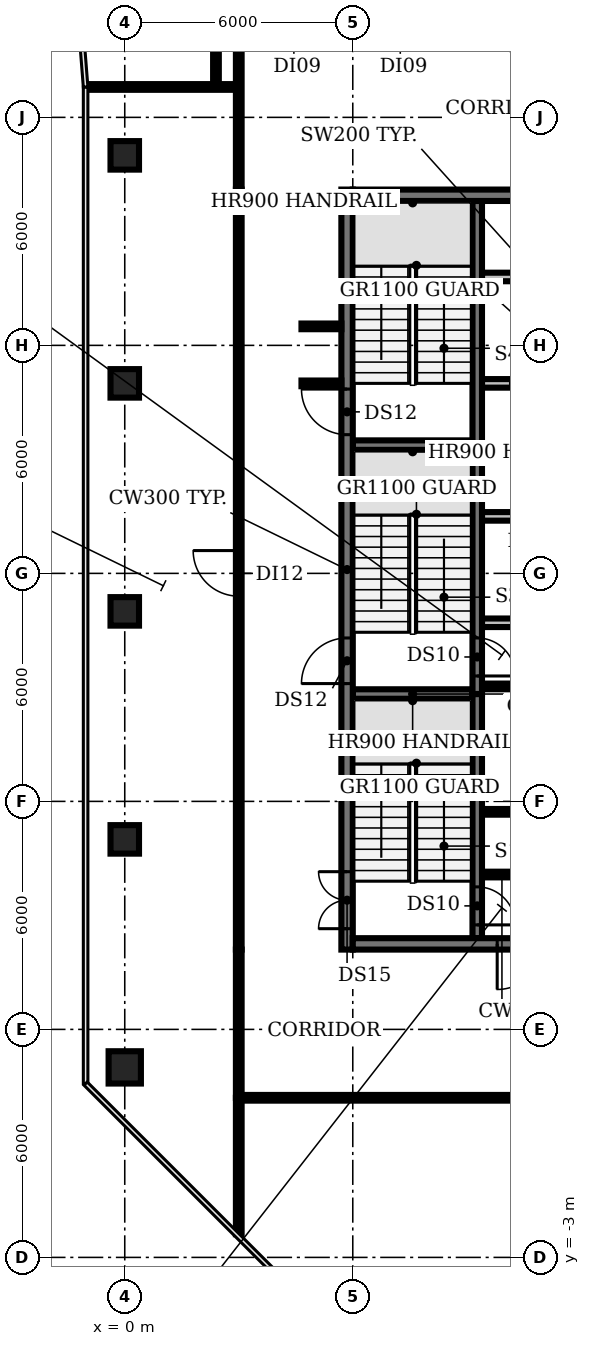
"""IFC4 building model, lengths in metres.
Left out: names, types, materials, properties, quantities, classifications, styles, units other than length and angle.
Written with IfcOpenShell. Run it as: python <this file> out.ifc"""

import sys

from ifc_helpers import new_model, si_unit, direction, frame, frame_2d, origin, origin_2d, place, context, subcontext, project, spatial, rectangle, circle, extrude, element, fill, save


model = new_model("IFC4")
c1 = context("Model", 3, precision=1e-05, world=origin(), true_north=direction((0.0, 1.0)))
c2 = subcontext(c1, "Body", "Model", "MODEL_VIEW")
j1 = project(units=[si_unit("LENGTHUNIT", "METRE"), si_unit("PLANEANGLEUNIT", "RADIAN")], contexts=[c1])
p1 = place(None, origin())
s1 = spatial("IfcSite", under=j1, at=p1, CompositionType="ELEMENT")
p2 = place(p1, origin())
s2 = spatial("IfcBuilding", under=s1, at=p2, CompositionType="ELEMENT")
p3 = place(p2, frame((0.0, 0.0, 306.2)))
s3 = spatial("IfcBuildingStorey", under=s2, at=p3, CompositionType="ELEMENT", Elevation=306.2)
p4 = place(p3, frame((0.0, 2.0, 0.0), z_axis=(0.0, 0.0, 1.0), x_axis=(1.0, 0.0, 0.0)))
e1 = element("IfcColumn", 1, at=p4, inside=s3, PredefinedType="COLUMN", context=c2, shape_type="SweptSolid", body=[
    extrude(circle(Radius=0.425, at=origin_2d()), origin(), (0.0, 0.0, 1.0), 3.85),
])
for number, where, z_axis, x_axis in (
    (2, (0.0, 8.0, 0.0), (0.0, 0.0, 1.0), (1.0, 0.0, 0.0)),
    (3, (0.0, 14.0, 0.0), (0.0, 0.0, 1.0), (1.0, 0.0, 0.0)),
    (4, (0.0, 20.0, 0.0), (0.0, 0.0, 1.0), (1.0, 0.0, 0.0)),
    (5, (0.0, 26.0, 0.0), (0.0, 0.0, 1.0), (1.0, 0.0, 0.0)),
):
    element("IfcColumn", number, at=place(p3, frame(where, z_axis=z_axis, x_axis=x_axis)), inside=s3, PredefinedType="COLUMN", context=c2, shape_type="SweptSolid", body=[
        extrude(rectangle(XDim=0.75, YDim=0.75, at=origin_2d()), origin(), (0.0, 0.0, 1.0), 3.85),
    ])
for number, where, z_axis, x_axis in (
    (6, (9.4, 7.075, 0.0), (0.0, 0.0, 1.0), (1.0, 0.0, 0.0)),
    (7, (9.4, 8.725, 0.0), (0.0, 0.0, 1.0), (1.0, 0.0, 0.0)),
    (8, (9.4, 10.375, 0.0), (0.0, 0.0, 1.0), (1.0, 0.0, 0.0)),
):
    element("IfcWall", number, at=place(p3, frame(where, z_axis=z_axis, x_axis=x_axis)), inside=s3, PredefinedType="SHEAR", context=c2, shape_type="SweptSolid", body=[
        extrude(rectangle(XDim=1.05, YDim=0.15, at=frame_2d((0.525, 0.0))), origin(), (0.0, 0.0, 1.0), 3.85),
    ])
p5 = place(p3, frame((6.0, 11.825, 0.0), z_axis=(0.0, 0.0, 1.0), x_axis=(1.0, 0.0, 0.0)))
e9 = element("IfcWall", 9, at=p5, inside=s3, PredefinedType="SHEAR", context=c2, shape_type="SweptSolid", body=[
    extrude(rectangle(XDim=3.15, YDim=0.25, at=frame_2d((1.575, 0.0))), origin(), (0.0, 0.0, 1.0), 3.85),
])
p6 = place(p3, frame((9.4, 12.025, 0.0), z_axis=(0.0, 0.0, 1.0), x_axis=(1.0, 0.0, 0.0)))
e10 = element("IfcWall", 10, at=p6, inside=s3, PredefinedType="SHEAR", context=c2, shape_type="SweptSolid", body=[
    extrude(rectangle(XDim=1.05, YDim=0.15, at=frame_2d((0.525, 0.0))), origin(), (0.0, 0.0, 1.0), 3.85),
])
p7 = place(p3, frame((9.4, 13.7, 0.0), z_axis=(0.0, 0.0, 1.0), x_axis=(1.0, 0.0, 0.0)))
e11 = element("IfcWall", 11, at=p7, inside=s3, PredefinedType="PARTITIONING", context=c2, shape_type="SweptSolid", body=[
    extrude(rectangle(XDim=4.0, YDim=0.225, at=frame_2d((2.0, 0.0))), origin(), (0.0, 0.0, 1.0), 3.85),
])
p8 = place(p3, frame((9.4, 16.5, 0.0), z_axis=(0.0, 0.0, 1.0), x_axis=(1.0, 0.0, 0.0)))
e12 = element("IfcWall", 12, at=p8, inside=s3, PredefinedType="PARTITIONING", context=c2, shape_type="SweptSolid", body=[
    extrude(rectangle(XDim=14.6, YDim=0.225, at=frame_2d((7.3, 0.0))), origin(), (0.0, 0.0, 1.0), 3.85),
])
p9 = place(p8, frame((0.85, 0.0, 0.0)))
e13 = element("IfcOpeningElement", 13, at=p9, cuts=e12, PredefinedType="OPENING", context=c2, shape_type="SweptSolid", body=[
    extrude(rectangle(XDim=0.9, YDim=2.1, at=frame_2d((0.45, 1.05))), frame((0.0, 0.123, 0.0), z_axis=(0.0, -1.0, 0.0), x_axis=(1.0, 0.0, 0.0)), (0.0, 0.0, 1.0), 0.245),
])
p10 = place(p8, frame((3.625, 0.0, 0.0)))
e14 = element("IfcOpeningElement", 14, at=p10, cuts=e12, PredefinedType="OPENING", context=c2, shape_type="SweptSolid", body=[
    extrude(rectangle(XDim=0.9, YDim=2.1, at=frame_2d((0.45, 1.05))), frame((0.0, 0.123, 0.0), z_axis=(0.0, -1.0, 0.0), x_axis=(1.0, 0.0, 0.0)), (0.0, 0.0, 1.0), 0.245),
])
p11 = place(p8, frame((7.775, 0.0, 0.0)))
e15 = element("IfcOpeningElement", 15, at=p11, cuts=e12, PredefinedType="OPENING", context=c2, shape_type="SweptSolid", body=[
    extrude(rectangle(XDim=1.0, YDim=2.1, at=frame_2d((0.5, 1.05))), frame((0.0, 0.123, 0.0), z_axis=(0.0, -1.0, 0.0), x_axis=(1.0, 0.0, 0.0)), (0.0, 0.0, 1.0), 0.245),
])
p12 = place(p8, frame((11.308, 0.0, 0.0)))
e16 = element("IfcOpeningElement", 16, at=p12, cuts=e12, PredefinedType="OPENING", context=c2, shape_type="SweptSolid", body=[
    extrude(rectangle(XDim=0.9, YDim=2.1, at=frame_2d((0.45, 1.05))), frame((0.0, 0.123, 0.0), z_axis=(0.0, -1.0, 0.0), x_axis=(1.0, 0.0, 0.0)), (0.0, 0.0, 1.0), 0.245),
])
p13 = place(p8, frame((13.083, 0.0, 0.0)))
e17 = element("IfcOpeningElement", 17, at=p13, cuts=e12, PredefinedType="OPENING", context=c2, shape_type="SweptSolid", body=[
    extrude(rectangle(XDim=0.9, YDim=2.1, at=frame_2d((0.45, 1.05))), frame((0.0, 0.123, 0.0), z_axis=(0.0, -1.0, 0.0), x_axis=(1.0, 0.0, 0.0)), (0.0, 0.0, 1.0), 0.245),
])
p14 = place(p3, frame((6.0, 18.375, 0.0), z_axis=(0.0, 0.0, 1.0), x_axis=(1.0, 0.0, 0.0)))
e18 = element("IfcWall", 18, at=p14, inside=s3, PredefinedType="SHEAR", context=c2, shape_type="SweptSolid", body=[
    extrude(rectangle(XDim=3.15, YDim=0.25, at=frame_2d((1.575, 0.0))), origin(), (0.0, 0.0, 1.0), 3.85),
])
p15 = place(p3, frame((24.0, 20.0, 0.0), z_axis=(0.0, 0.0, 1.0), x_axis=(-1.0, 0.0, 0.0)))
e19 = element("IfcWall", 19, at=p15, inside=s3, PredefinedType="PARTITIONING", context=c2, shape_type="SweptSolid", body=[
    extrude(rectangle(XDim=14.6, YDim=0.225, at=frame_2d((7.3, 0.0))), origin(), (0.0, 0.0, 1.0), 3.85),
])
p16 = place(p15, frame((12.75, 0.0, 0.0)))
e20 = element("IfcOpeningElement", 20, at=p16, cuts=e19, PredefinedType="OPENING", context=c2, shape_type="SweptSolid", body=[
    extrude(rectangle(XDim=1.1, YDim=2.1, at=frame_2d((0.55, 1.05))), frame((0.0, 0.123, 0.0), z_axis=(0.0, -1.0, 0.0), x_axis=(1.0, 0.0, 0.0)), (0.0, 0.0, 1.0), 0.245),
])
p17 = place(p15, frame((9.95, 0.0, 0.0)))
e21 = element("IfcOpeningElement", 21, at=p17, cuts=e19, PredefinedType="OPENING", context=c2, shape_type="SweptSolid", body=[
    extrude(rectangle(XDim=1.1, YDim=2.1, at=frame_2d((0.55, 1.05))), frame((0.0, 0.123, 0.0), z_axis=(0.0, -1.0, 0.0), x_axis=(1.0, 0.0, 0.0)), (0.0, 0.0, 1.0), 0.245),
])
p18 = place(p15, frame((7.15, 0.0, 0.0)))
e22 = element("IfcOpeningElement", 22, at=p18, cuts=e19, PredefinedType="OPENING", context=c2, shape_type="SweptSolid", body=[
    extrude(rectangle(XDim=1.1, YDim=2.1, at=frame_2d((0.55, 1.05))), frame((0.0, 0.123, 0.0), z_axis=(0.0, -1.0, 0.0), x_axis=(1.0, 0.0, 0.0)), (0.0, 0.0, 1.0), 0.245),
])
p19 = place(p15, frame((4.35, 0.0, 0.0)))
e23 = element("IfcOpeningElement", 23, at=p19, cuts=e19, PredefinedType="OPENING", context=c2, shape_type="SweptSolid", body=[
    extrude(rectangle(XDim=1.1, YDim=2.1, at=frame_2d((0.55, 1.05))), frame((0.0, 0.123, 0.0), z_axis=(0.0, -1.0, 0.0), x_axis=(1.0, 0.0, 0.0)), (0.0, 0.0, 1.0), 0.245),
])
p20 = place(p15, frame((2.308, 0.0, 0.0)))
e24 = element("IfcOpeningElement", 24, at=p20, cuts=e19, PredefinedType="OPENING", context=c2, shape_type="SweptSolid", body=[
    extrude(rectangle(XDim=0.9, YDim=2.1, at=frame_2d((0.45, 1.05))), frame((0.0, 0.123, 0.0), z_axis=(0.0, -1.0, 0.0), x_axis=(1.0, 0.0, 0.0)), (0.0, 0.0, 1.0), 0.245),
])
p21 = place(p15, frame((0.633, 0.0, 0.0)))
e25 = element("IfcOpeningElement", 25, at=p21, cuts=e19, PredefinedType="OPENING", context=c2, shape_type="SweptSolid", body=[
    extrude(rectangle(XDim=0.9, YDim=2.1, at=frame_2d((0.45, 1.05))), frame((0.0, 0.123, 0.0), z_axis=(0.0, -1.0, 0.0), x_axis=(1.0, 0.0, 0.0)), (0.0, 0.0, 1.0), 0.245),
])
p22 = place(p3, frame((9.4, 22.8, 0.0), z_axis=(0.0, 0.0, 1.0), x_axis=(1.0, 0.0, 0.0)))
e26 = element("IfcWall", 26, at=p22, inside=s3, PredefinedType="PARTITIONING", context=c2, shape_type="SweptSolid", body=[
    extrude(rectangle(XDim=14.6, YDim=0.225, at=frame_2d((7.3, 0.0))), origin(), (0.0, 0.0, 1.0), 3.85),
])
p23 = place(p3, frame((9.275, 11.825, 0.0), z_axis=(0.0, 0.0, 1.0), x_axis=(0.0, -1.0, 0.0)))
e27 = element("IfcWall", 27, at=p23, inside=s3, PredefinedType="SHEAR", context=c2, shape_type="SweptSolid", body=[
    extrude(rectangle(XDim=6.425, YDim=0.25, at=frame_2d((3.212, 0.0))), origin(), (0.0, 0.0, 1.0), 3.85),
])
p24 = place(p23, frame((5.075, 0.0, 0.0)))
e28 = element("IfcOpeningElement", 28, at=p24, cuts=e27, PredefinedType="OPENING", context=c2, shape_type="SweptSolid", body=[
    extrude(rectangle(XDim=1.0, YDim=2.1, at=frame_2d((0.5, 1.05))), frame((0.0, 0.135, 0.0), z_axis=(0.0, -1.0, 0.0), x_axis=(1.0, 0.0, 0.0)), (0.0, 0.0, 1.0), 0.27),
])
p25 = place(p3, frame((9.275, 18.375, 0.0), z_axis=(0.0, 0.0, 1.0), x_axis=(0.0, -1.0, 0.0)))
e29 = element("IfcWall", 29, at=p25, inside=s3, PredefinedType="SHEAR", context=c2, shape_type="SweptSolid", body=[
    extrude(rectangle(XDim=6.55, YDim=0.25, at=frame_2d((3.275, 0.0))), origin(), (0.0, 0.0, 1.0), 3.85),
])
p26 = place(p25, frame((5.075, 0.0, 0.0)))
e30 = element("IfcOpeningElement", 30, at=p26, cuts=e29, PredefinedType="OPENING", context=c2, shape_type="SweptSolid", body=[
    extrude(rectangle(XDim=1.0, YDim=2.1, at=frame_2d((0.5, 1.05))), frame((0.0, 0.135, 0.0), z_axis=(0.0, -1.0, 0.0), x_axis=(1.0, 0.0, 0.0)), (0.0, 0.0, 1.0), 0.27),
])
p27 = place(p3, frame((9.275, 18.375, 0.0), z_axis=(0.0, 0.0, 1.0), x_axis=(0.0, 1.0, 0.0)))
e31 = element("IfcWall", 31, at=p27, inside=s3, PredefinedType="SHEAR", context=c2, shape_type="SweptSolid", body=[
    extrude(rectangle(XDim=6.425, YDim=0.25, at=frame_2d((3.212, 0.0))), origin(), (0.0, 0.0, 1.0), 3.85),
])
p28 = place(p3, frame((5.85, 5.1, 0.0), z_axis=(0.0, 0.0, 1.0), x_axis=(0.0, 1.0, 0.0)))
e32 = element("IfcWall", 32, at=p28, inside=s3, PredefinedType="SHEAR", context=c2, shape_type="SweptSolid", body=[
    extrude(rectangle(XDim=20.0, YDim=0.3, at=frame_2d((10.0, 0.0))), origin(), (0.0, 0.0, 1.0), 3.85),
])
p29 = place(p28, frame((0.55, 0.0, 0.0)))
e33 = element("IfcOpeningElement", 33, at=p29, cuts=e32, PredefinedType="OPENING", context=c2, shape_type="SweptSolid", body=[
    extrude(rectangle(XDim=1.5, YDim=2.1, at=frame_2d((0.75, 1.05))), frame((0.0, 0.16, 0.0), z_axis=(0.0, -1.0, 0.0), x_axis=(1.0, 0.0, 0.0)), (0.0, 0.0, 1.0), 0.32),
])
p30 = place(p28, frame((7.0, 0.0, 0.0)))
e34 = element("IfcOpeningElement", 34, at=p30, cuts=e32, PredefinedType="OPENING", context=c2, shape_type="SweptSolid", body=[
    extrude(rectangle(XDim=1.2, YDim=2.1, at=frame_2d((0.6, 1.05))), frame((0.0, 0.16, 0.0), z_axis=(0.0, -1.0, 0.0), x_axis=(1.0, 0.0, 0.0)), (0.0, 0.0, 1.0), 0.32),
])
p31 = place(p28, frame((13.55, 0.0, 0.0)))
e35 = element("IfcOpeningElement", 35, at=p31, cuts=e32, PredefinedType="OPENING", context=c2, shape_type="SweptSolid", body=[
    extrude(rectangle(XDim=1.2, YDim=2.1, at=frame_2d((0.6, 1.05))), frame((0.0, 0.16, 0.0), z_axis=(0.0, -1.0, 0.0), x_axis=(1.0, 0.0, 0.0)), (0.0, 0.0, 1.0), 0.32),
])
p32 = place(p3, frame((24.0, 5.25, 0.0), z_axis=(0.0, 0.0, 1.0), x_axis=(-1.0, 0.0, 0.0)))
e36 = element("IfcWall", 36, at=p32, inside=s3, PredefinedType="SHEAR", context=c2, shape_type="SweptSolid", body=[
    extrude(rectangle(XDim=18.0, YDim=0.3, at=frame_2d((9.0, 0.0))), origin(), (0.0, 0.0, 1.0), 3.85),
])
p33 = place(p32, frame((13.0, 0.0, 0.0)))
e37 = element("IfcOpeningElement", 37, at=p33, cuts=e36, PredefinedType="OPENING", context=c2, shape_type="SweptSolid", body=[
    extrude(rectangle(XDim=1.2, YDim=2.1, at=frame_2d((0.6, 1.05))), frame((0.0, 0.16, 0.0), z_axis=(0.0, -1.0, 0.0), x_axis=(1.0, 0.0, 0.0)), (0.0, 0.0, 1.0), 0.32),
])
p34 = place(p32, frame((4.9, 0.0, 0.0)))
e38 = element("IfcOpeningElement", 38, at=p34, cuts=e36, PredefinedType="OPENING", context=c2, shape_type="SweptSolid", body=[
    extrude(rectangle(XDim=1.0, YDim=2.1, at=frame_2d((0.5, 1.05))), frame((0.0, 0.16, 0.0), z_axis=(0.0, -1.0, 0.0), x_axis=(1.0, 0.0, 0.0)), (0.0, 0.0, 1.0), 0.32),
])
p35 = place(p3, frame((6.0, 24.95, 0.0), z_axis=(0.0, 0.0, 1.0), x_axis=(1.0, 0.0, 0.0)))
e39 = element("IfcWall", 39, at=p35, inside=s3, PredefinedType="SHEAR", context=c2, shape_type="SweptSolid", body=[
    extrude(rectangle(XDim=18.0, YDim=0.3, at=frame_2d((9.0, 0.0))), origin(), (0.0, 0.0, 1.0), 3.85),
])
p36 = place(p3, frame((-0.967, 27.8, 0.0), z_axis=(0.0, 0.0, 1.0), x_axis=(1.0, 0.0, 0.0)))
e40 = element("IfcWall", 40, at=p36, inside=s3, PredefinedType="PARTITIONING", context=c2, shape_type="SweptSolid", body=[
    extrude(rectangle(XDim=3.967, YDim=0.15, at=frame_2d((1.984, 0.0))), origin(), (0.0, 0.0, 1.0), 2.9),
])
p37 = place(p3, frame((2.4, 27.8, 0.0), z_axis=(0.0, 0.0, 1.0), x_axis=(0.0, 1.0, 0.0)))
e41 = element("IfcWall", 41, at=p37, inside=s3, PredefinedType="PARTITIONING", context=c2, shape_type="SweptSolid", body=[
    extrude(rectangle(XDim=6.0, YDim=0.15, at=frame_2d((3.0, 0.0))), origin(), (0.0, 0.0, 1.0), 2.9),
])
p38 = place(p3, frame((3.0, -2.39, 0.0), z_axis=(0.0, 0.0, 1.0), x_axis=(0.0, 1.0, 0.0)))
e42 = element("IfcWall", 42, at=p38, inside=s3, PredefinedType="PARTITIONING", context=c2, shape_type="SweptSolid", body=[
    extrude(rectangle(XDim=3.59, YDim=0.15, at=frame_2d((1.795, 0.0))), origin(), (0.0, 0.0, 1.0), 2.9),
])
p39 = place(p3, frame((3.0, 1.2, 0.0), z_axis=(0.0, 0.0, 1.0), x_axis=(0.0, 1.0, 0.0)))
e43 = element("IfcWall", 43, at=p39, inside=s3, PredefinedType="PARTITIONING", context=c2, shape_type="SweptSolid", body=[
    extrude(rectangle(XDim=3.9, YDim=0.15, at=frame_2d((1.95, 0.0))), origin(), (0.0, 0.0, 1.0), 2.9),
])
p40 = place(p3, frame((3.0, 5.1, 0.0), z_axis=(0.0, 0.0, 1.0), x_axis=(0.0, 1.0, 0.0)))
e44 = element("IfcWall", 44, at=p40, inside=s3, PredefinedType="PARTITIONING", context=c2, shape_type="SweptSolid", body=[
    extrude(rectangle(XDim=20.0, YDim=0.15, at=frame_2d((10.0, 0.0))), origin(), (0.0, 0.0, 1.0), 2.9),
])
p41 = place(p40, frame((9.3, 0.0, 0.0)))
e45 = element("IfcOpeningElement", 45, at=p41, cuts=e44, PredefinedType="OPENING", context=c2, shape_type="SweptSolid", body=[
    extrude(rectangle(XDim=1.2, YDim=2.1, at=frame_2d((0.6, 1.05))), frame((0.0, 0.085, 0.0), z_axis=(0.0, -1.0, 0.0), x_axis=(1.0, 0.0, 0.0)), (0.0, 0.0, 1.0), 0.17),
])
p42 = place(p3, frame((3.0, 25.1, 0.0), z_axis=(0.0, 0.0, 1.0), x_axis=(0.0, 1.0, 0.0)))
e46 = element("IfcWall", 46, at=p42, inside=s3, PredefinedType="PARTITIONING", context=c2, shape_type="SweptSolid", body=[
    extrude(rectangle(XDim=3.9, YDim=0.15, at=frame_2d((1.95, 0.0))), origin(), (0.0, 0.0, 1.0), 2.9),
])
for number, where, z_axis, x_axis in (
    (47, (4.65, 20.0, 0.0), (0.0, 0.0, 1.0), (1.0, 0.0, 0.0)),
    (48, (4.65, 21.5, 0.0), (0.0, 0.0, 1.0), (1.0, 0.0, 0.0)),
):
    element("IfcWall", number, at=place(p3, frame(where, z_axis=z_axis, x_axis=x_axis)), inside=s3, PredefinedType="PARTITIONING", context=c2, shape_type="SweptSolid", body=[
        extrude(rectangle(XDim=1.05, YDim=0.15, at=frame_2d((0.525, 0.0))), origin(), (0.0, 0.0, 1.0), 2.9),
    ])
p43 = place(p3, frame((27.0, 1.2, 0.0), z_axis=(0.0, 0.0, 1.0), x_axis=(-1.0, 0.0, 0.0)))
e49 = element("IfcWall", 49, at=p43, inside=s3, PredefinedType="PARTITIONING", context=c2, shape_type="SweptSolid", body=[
    extrude(rectangle(XDim=24.0, YDim=0.15, at=frame_2d((12.0, 0.0))), origin(), (0.0, 0.0, 1.0), 2.9),
])
p44 = place(p43, frame((11.5, 0.0, 0.0)))
e50 = element("IfcOpeningElement", 50, at=p44, cuts=e49, PredefinedType="OPENING", context=c2, shape_type="SweptSolid", body=[
    extrude(rectangle(XDim=1.2, YDim=2.1, at=frame_2d((0.6, 1.05))), frame((0.0, 0.085, 0.0), z_axis=(0.0, -1.0, 0.0), x_axis=(1.0, 0.0, 0.0)), (0.0, 0.0, 1.0), 0.17),
])
p45 = place(p24, origin())
e51 = element("IfcDoor", 51, at=p45, inside=s3, OperationType="SINGLE_SWING_RIGHT", PredefinedType="DOOR", context=c2, shape_type="SweptSolid", body=[
    extrude(rectangle(XDim=1.0, YDim=2.1, at=frame_2d((0.5, 1.05))), frame((0.0, 0.025, 0.0), z_axis=(0.0, -1.0, 0.0), x_axis=(1.0, 0.0, 0.0)), (0.0, 0.0, 1.0), 0.05),
])
fill(e28, e51)
p46 = place(p26, origin())
e52 = element("IfcDoor", 52, at=p46, inside=s3, OperationType="SINGLE_SWING_RIGHT", PredefinedType="DOOR", context=c2, shape_type="SweptSolid", body=[
    extrude(rectangle(XDim=1.0, YDim=2.1, at=frame_2d((0.5, 1.05))), frame((0.0, 0.025, 0.0), z_axis=(0.0, -1.0, 0.0), x_axis=(1.0, 0.0, 0.0)), (0.0, 0.0, 1.0), 0.05),
])
fill(e30, e52)
p47 = place(p29, origin())
e53 = element("IfcDoor", 53, at=p47, inside=s3, OperationType="DOUBLE_DOOR_SINGLE_SWING", PredefinedType="DOOR", context=c2, shape_type="SweptSolid", body=[
    extrude(rectangle(XDim=1.5, YDim=2.1, at=frame_2d((0.75, 1.05))), frame((0.0, 0.025, 0.0), z_axis=(0.0, -1.0, 0.0), x_axis=(1.0, 0.0, 0.0)), (0.0, 0.0, 1.0), 0.05),
])
fill(e33, e53)
p48 = place(p30, origin())
e54 = element("IfcDoor", 54, at=p48, inside=s3, OperationType="SINGLE_SWING_LEFT", PredefinedType="DOOR", context=c2, shape_type="SweptSolid", body=[
    extrude(rectangle(XDim=1.2, YDim=2.1, at=frame_2d((0.6, 1.05))), frame((0.0, 0.025, 0.0), z_axis=(0.0, -1.0, 0.0), x_axis=(1.0, 0.0, 0.0)), (0.0, 0.0, 1.0), 0.05),
])
fill(e34, e54)
p49 = place(p31, origin())
e55 = element("IfcDoor", 55, at=p49, inside=s3, OperationType="SINGLE_SWING_RIGHT", PredefinedType="DOOR", context=c2, shape_type="SweptSolid", body=[
    extrude(rectangle(XDim=1.2, YDim=2.1, at=frame_2d((0.6, 1.05))), frame((0.0, 0.025, 0.0), z_axis=(0.0, -1.0, 0.0), x_axis=(1.0, 0.0, 0.0)), (0.0, 0.0, 1.0), 0.05),
])
fill(e35, e55)
p50 = place(p33, origin())
e56 = element("IfcDoor", 56, at=p50, inside=s3, OperationType="SINGLE_SWING_RIGHT", PredefinedType="DOOR", context=c2, shape_type="SweptSolid", body=[
    extrude(rectangle(XDim=1.2, YDim=2.1, at=frame_2d((0.6, 1.05))), frame((0.0, 0.025, 0.0), z_axis=(0.0, -1.0, 0.0), x_axis=(1.0, 0.0, 0.0)), (0.0, 0.0, 1.0), 0.05),
])
fill(e37, e56)
p51 = place(p41, origin())
e57 = element("IfcDoor", 57, at=p51, inside=s3, OperationType="SINGLE_SWING_RIGHT", PredefinedType="DOOR", context=c2, shape_type="SweptSolid", body=[
    extrude(rectangle(XDim=1.2, YDim=2.1, at=frame_2d((0.6, 1.05))), frame((0.0, 0.025, 0.0), z_axis=(0.0, -1.0, 0.0), x_axis=(1.0, 0.0, 0.0)), (0.0, 0.0, 1.0), 0.05),
])
fill(e45, e57)
save(model, sys.argv[1])
